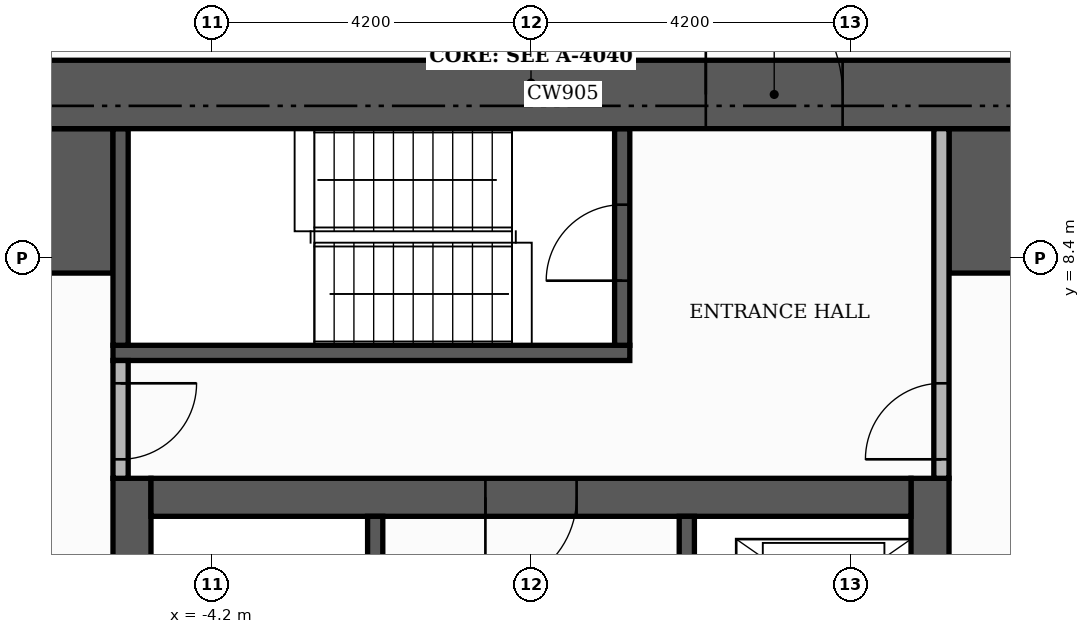
"""IFC4 building model, lengths in metres.
Left out: names, types, materials, properties, quantities, classifications, styles, units other than length and angle.
Written with IfcOpenShell. Run it as: python <this file> out.ifc"""

import sys

from ifc_helpers import new_model, si_unit, direction, frame, frame_2d, origin, place, context, subcontext, project, spatial, rectangle, extrude, element, fill, save


model = new_model("IFC4")
c1 = context("Model", 3, precision=1e-05, world=origin(), true_north=direction((0.0, 1.0)))
c2 = subcontext(c1, "Body", "Model", "MODEL_VIEW")
j1 = project(units=[si_unit("LENGTHUNIT", "METRE"), si_unit("PLANEANGLEUNIT", "RADIAN")], contexts=[c1])
p1 = place(None, origin())
s1 = spatial("IfcSite", under=j1, at=p1, CompositionType="ELEMENT")
p2 = place(p1, origin())
s2 = spatial("IfcBuilding", under=s1, at=p2, CompositionType="ELEMENT")
p3 = place(p2, frame((0.0, 0.0, 244.5)))
s3 = spatial("IfcBuildingStorey", under=s2, at=p3, CompositionType="ELEMENT", Elevation=244.5)
for number, where, z_axis, x_axis in (
    (1, (-5.25, -5.0, 0.0), (0.0, 0.0, 1.0), (0.0, 1.0, 0.0)),
    (2, (5.25, -5.0, 0.0), (0.0, 0.0, 1.0), (0.0, 1.0, 0.0)),
):
    element("IfcWall", number, at=place(p3, frame(where, z_axis=z_axis, x_axis=x_axis)), inside=s3, PredefinedType="SHEAR", context=c2, shape_type="SweptSolid", body=[
        extrude(rectangle(XDim=10.5, YDim=0.5, at=frame_2d((5.25, 0.0))), origin(), (0.0, 0.0, 1.0), 3.48),
    ])
p4 = place(p3, frame((-5.0, 5.25, 0.0), z_axis=(0.0, 0.0, 1.0), x_axis=(1.0, 0.0, 0.0)))
e3 = element("IfcWall", 3, at=p4, inside=s3, PredefinedType="SHEAR", context=c2, shape_type="SweptSolid", body=[
    extrude(rectangle(XDim=10.0, YDim=0.5, at=frame_2d((5.0, 0.0))), origin(), (0.0, 0.0, 1.0), 3.48),
])
p5 = place(p4, frame((4.4, 0.0, 0.0)))
e4 = element("IfcOpeningElement", 4, at=p5, cuts=e3, PredefinedType="OPENING", context=c2, shape_type="SweptSolid", body=[
    extrude(rectangle(XDim=1.2, YDim=2.1, at=frame_2d((0.6, 1.05))), frame((0.0, 0.26, 0.0), z_axis=(0.0, -1.0, 0.0), x_axis=(1.0, 0.0, 0.0)), (0.0, 0.0, 1.0), 0.52),
])
for number, where, z_axis, x_axis in (
    (5, (-10.1, 9.15, 0.0), (0.0, 0.0, 1.0), (1.0, 0.0, 0.0)),
    (6, (5.5, 9.15, 0.0), (0.0, 0.0, 1.0), (1.0, 0.0, 0.0)),
):
    element("IfcWall", number, at=place(p3, frame(where, z_axis=z_axis, x_axis=x_axis)), inside=s3, PredefinedType="SHEAR", context=c2, shape_type="SweptSolid", body=[
        extrude(rectangle(XDim=4.6, YDim=1.9, at=frame_2d((2.3, 0.0))), origin(), (0.0, 0.0, 1.0), 3.48),
    ])
p6 = place(p3, frame((-2.05, -1.4, 0.0), z_axis=(0.0, 0.0, 1.0), x_axis=(0.0, 1.0, 0.0)))
e7 = element("IfcWall", 7, at=p6, inside=s3, PredefinedType="SHEAR", context=c2, shape_type="SweptSolid", body=[
    extrude(rectangle(XDim=6.4, YDim=0.2, at=frame_2d((3.2, 0.0))), origin(), (0.0, 0.0, 1.0), 3.48),
])
p7 = place(p6, frame((0.15, 0.0, 0.0)))
e8 = element("IfcOpeningElement", 8, at=p7, cuts=e7, PredefinedType="OPENING", context=c2, shape_type="SweptSolid", body=[
    extrude(rectangle(XDim=1.0, YDim=2.1, at=frame_2d((0.5, 1.05))), frame((0.0, 0.11, 0.0), z_axis=(0.0, -1.0, 0.0), x_axis=(1.0, 0.0, 0.0)), (0.0, 0.0, 1.0), 0.22),
])
p8 = place(p3, frame((-5.5, 7.15, 0.0), z_axis=(0.0, 0.0, 1.0), x_axis=(1.0, 0.0, 0.0)))
e9 = element("IfcWall", 9, at=p8, inside=s3, PredefinedType="SHEAR", context=c2, shape_type="SweptSolid", body=[
    extrude(rectangle(XDim=6.8, YDim=0.2, at=frame_2d((3.4, 0.0))), origin(), (0.0, 0.0, 1.0), 3.48),
])
p9 = place(p3, frame((-5.4, 7.25, 0.0), z_axis=(0.0, 0.0, 1.0), x_axis=(0.0, 1.0, 0.0)))
e10 = element("IfcWall", 10, at=p9, inside=s3, PredefinedType="SHEAR", context=c2, shape_type="SweptSolid", body=[
    extrude(rectangle(XDim=2.85, YDim=0.2, at=frame_2d((1.425, 0.0))), origin(), (0.0, 0.0, 1.0), 3.48),
])
p10 = place(p3, frame((1.2, 7.25, 0.0), z_axis=(0.0, 0.0, 1.0), x_axis=(0.0, 1.0, 0.0)))
e11 = element("IfcWall", 11, at=p10, inside=s3, PredefinedType="SHEAR", context=c2, shape_type="SweptSolid", body=[
    extrude(rectangle(XDim=2.85, YDim=0.2, at=frame_2d((1.425, 0.0))), origin(), (0.0, 0.0, 1.0), 3.48),
])
p11 = place(p10, frame((0.85, 0.0, 0.0)))
e12 = element("IfcOpeningElement", 12, at=p11, cuts=e11, PredefinedType="OPENING", context=c2, shape_type="SweptSolid", body=[
    extrude(rectangle(XDim=1.0, YDim=2.1, at=frame_2d((0.5, 1.05))), frame((0.0, 0.11, 0.0), z_axis=(0.0, -1.0, 0.0), x_axis=(1.0, 0.0, 0.0)), (0.0, 0.0, 1.0), 0.22),
])
p12 = place(p3, frame((2.05, 1.6, 0.0), z_axis=(0.0, 0.0, 1.0), x_axis=(0.0, 1.0, 0.0)))
e13 = element("IfcWall", 13, at=p12, inside=s3, PredefinedType="SHEAR", context=c2, shape_type="SweptSolid", body=[
    extrude(rectangle(XDim=3.4, YDim=0.2, at=frame_2d((1.7, 0.0))), origin(), (0.0, 0.0, 1.0), 3.48),
])
p13 = place(p12, frame((1.75, 0.0, 0.0)))
e14 = element("IfcOpeningElement", 14, at=p13, cuts=e13, PredefinedType="OPENING", context=c2, shape_type="SweptSolid", body=[
    extrude(rectangle(XDim=1.1, YDim=2.1, at=frame_2d((0.55, 1.05))), frame((0.0, 0.11, 0.0), z_axis=(0.0, -1.0, 0.0), x_axis=(1.0, 0.0, 0.0)), (0.0, 0.0, 1.0), 0.22),
])
p14 = place(p12, frame((0.15, 0.0, 0.0)))
e15 = element("IfcOpeningElement", 15, at=p14, cuts=e13, PredefinedType="OPENING", context=c2, shape_type="SweptSolid", body=[
    extrude(rectangle(XDim=0.8, YDim=2.1, at=frame_2d((0.4, 1.05))), frame((0.0, 0.11, 0.0), z_axis=(0.0, -1.0, 0.0), x_axis=(1.0, 0.0, 0.0)), (0.0, 0.0, 1.0), 0.22),
])
p15 = place(p3, frame((-11.0, 10.55, 0.0), z_axis=(0.0, 0.0, 1.0), x_axis=(1.0, 0.0, 0.0)))
e16 = element("IfcWall", 16, at=p15, inside=s3, PredefinedType="SHEAR", context=c2, shape_type="SweptSolid", body=[
    extrude(rectangle(XDim=22.0, YDim=0.9, at=frame_2d((11.0, 0.0))), origin(), (0.0, 0.0, 1.0), 3.48),
])
p16 = place(p15, frame((13.3, 0.0, 0.0)))
e17 = element("IfcOpeningElement", 17, at=p16, cuts=e16, PredefinedType="OPENING", context=c2, shape_type="SweptSolid", body=[
    extrude(rectangle(XDim=1.8, YDim=2.2, at=frame_2d((0.9, 1.1))), frame((0.0, 0.46, 0.0), z_axis=(0.0, -1.0, 0.0), x_axis=(1.0, 0.0, 0.0)), (0.0, 0.0, 1.0), 0.92),
])
p17 = place(p3, frame((-5.4, 5.5, 0.0), z_axis=(0.0, 0.0, 1.0), x_axis=(0.0, 1.0, 0.0)))
e18 = element("IfcWall", 18, at=p17, inside=s3, PredefinedType="PARTITIONING", context=c2, shape_type="SweptSolid", body=[
    extrude(rectangle(XDim=1.55, YDim=0.2, at=frame_2d((0.775, 0.0))), origin(), (0.0, 0.0, 1.0), 3.48),
])
p18 = place(p17, frame((0.25, 0.0, 0.0)))
e19 = element("IfcOpeningElement", 19, at=p18, cuts=e18, PredefinedType="OPENING", context=c2, shape_type="SweptSolid", body=[
    extrude(rectangle(XDim=1.0, YDim=2.1, at=frame_2d((0.5, 1.05))), frame((0.0, 0.11, 0.0), z_axis=(0.0, -1.0, 0.0), x_axis=(1.0, 0.0, 0.0)), (0.0, 0.0, 1.0), 0.22),
])
p19 = place(p3, frame((5.4, 5.5, 0.0), z_axis=(0.0, 0.0, 1.0), x_axis=(0.0, 1.0, 0.0)))
e20 = element("IfcWall", 20, at=p19, inside=s3, PredefinedType="PARTITIONING", context=c2, shape_type="SweptSolid", body=[
    extrude(rectangle(XDim=4.6, YDim=0.2, at=frame_2d((2.3, 0.0))), origin(), (0.0, 0.0, 1.0), 3.48),
])
p20 = place(p19, frame((0.25, 0.0, 0.0)))
e21 = element("IfcOpeningElement", 21, at=p20, cuts=e20, PredefinedType="OPENING", context=c2, shape_type="SweptSolid", body=[
    extrude(rectangle(XDim=1.0, YDim=2.1, at=frame_2d((0.5, 1.05))), frame((0.0, 0.11, 0.0), z_axis=(0.0, -1.0, 0.0), x_axis=(1.0, 0.0, 0.0)), (0.0, 0.0, 1.0), 0.22),
])
p21 = place(p5, frame((1.2, 0.0, 0.0), z_axis=(0.0, 0.0, 1.0), x_axis=(-1.0, 0.0, 0.0)))
e22 = element("IfcDoor", 22, at=p21, inside=s3, OperationType="SINGLE_SWING_LEFT", PredefinedType="DOOR", context=c2, shape_type="SweptSolid", body=[
    extrude(rectangle(XDim=1.2, YDim=2.1, at=frame_2d((0.6, 1.05))), frame((0.0, 0.025, 0.0), z_axis=(0.0, -1.0, 0.0), x_axis=(1.0, 0.0, 0.0)), (0.0, 0.0, 1.0), 0.05),
])
fill(e4, e22)
p22 = place(p11, origin())
e23 = element("IfcDoor", 23, at=p22, inside=s3, OperationType="SINGLE_SWING_LEFT", PredefinedType="DOOR", context=c2, shape_type="SweptSolid", body=[
    extrude(rectangle(XDim=1.0, YDim=2.1, at=frame_2d((0.5, 1.05))), frame((0.0, 0.025, 0.0), z_axis=(0.0, -1.0, 0.0), x_axis=(1.0, 0.0, 0.0)), (0.0, 0.0, 1.0), 0.05),
])
fill(e12, e23)
p23 = place(p18, frame((1.0, 0.0, 0.0), z_axis=(0.0, 0.0, 1.0), x_axis=(-1.0, 0.0, 0.0)))
e24 = element("IfcDoor", 24, at=p23, inside=s3, OperationType="SINGLE_SWING_RIGHT", PredefinedType="DOOR", context=c2, shape_type="SweptSolid", body=[
    extrude(rectangle(XDim=1.0, YDim=2.1, at=frame_2d((0.5, 1.05))), frame((0.0, 0.025, 0.0), z_axis=(0.0, -1.0, 0.0), x_axis=(1.0, 0.0, 0.0)), (0.0, 0.0, 1.0), 0.05),
])
fill(e19, e24)
p24 = place(p20, origin())
e25 = element("IfcDoor", 25, at=p24, inside=s3, OperationType="SINGLE_SWING_LEFT", PredefinedType="DOOR", context=c2, shape_type="SweptSolid", body=[
    extrude(rectangle(XDim=1.0, YDim=2.1, at=frame_2d((0.5, 1.05))), frame((0.0, 0.025, 0.0), z_axis=(0.0, -1.0, 0.0), x_axis=(1.0, 0.0, 0.0)), (0.0, 0.0, 1.0), 0.05),
])
fill(e21, e25)
p25 = place(p16, origin())
e26 = element("IfcDoor", 26, at=p25, inside=s3, OperationType="DOUBLE_DOOR_SINGLE_SWING", PredefinedType="DOOR", context=c2, shape_type="SweptSolid", body=[
    extrude(rectangle(XDim=1.8, YDim=2.2, at=frame_2d((0.9, 1.1))), frame((0.0, 0.025, 0.0), z_axis=(0.0, -1.0, 0.0), x_axis=(1.0, 0.0, 0.0)), (0.0, 0.0, 1.0), 0.05),
])
fill(e17, e26)
save(model, sys.argv[1])
